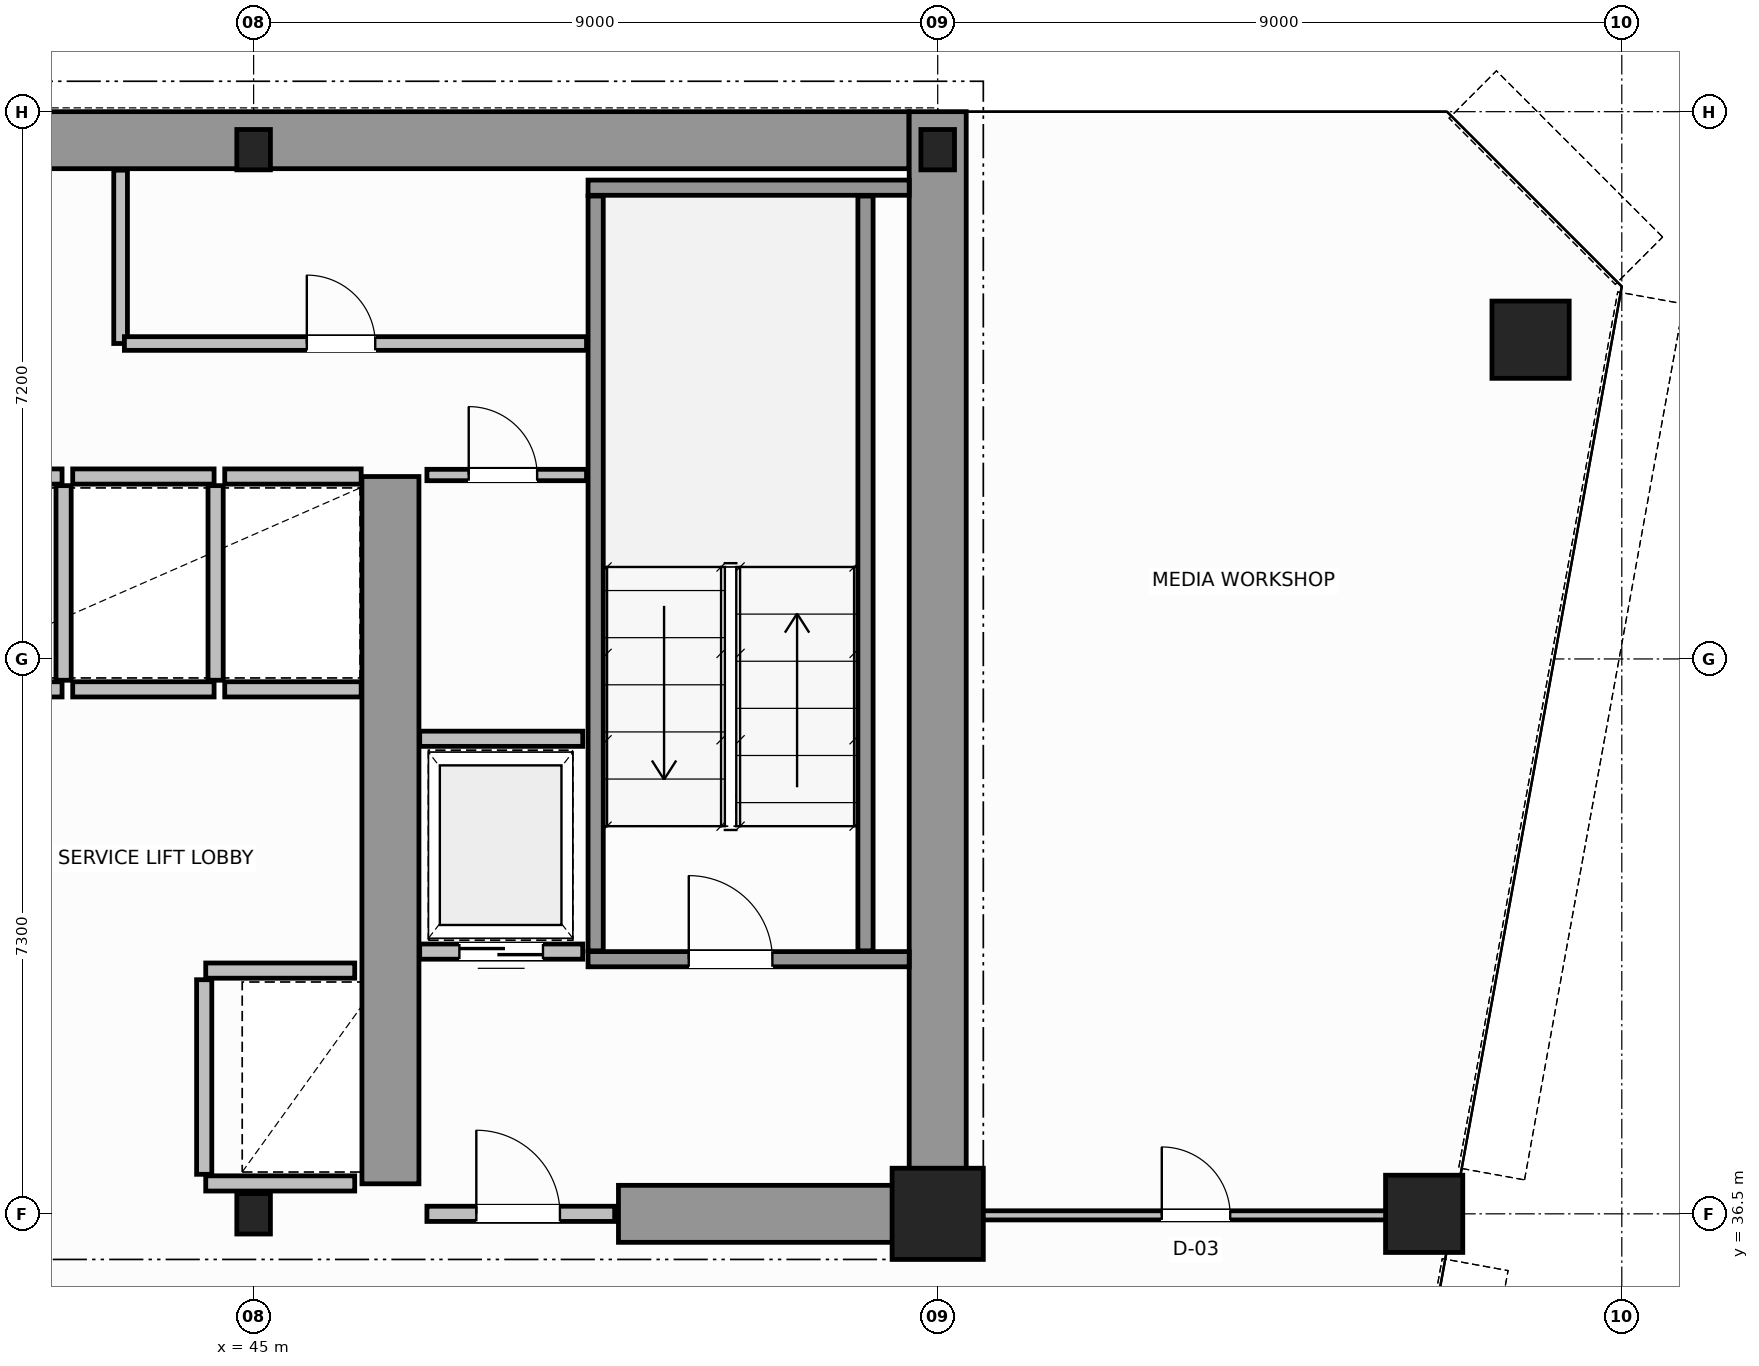
"""IFC4 building model, lengths in metres.
Left out: names, types, materials, properties, quantities, classifications, styles, units other than length and angle.
Written with IfcOpenShell. Run it as: python <this file> out.ifc"""

import sys

from ifc_helpers import new_model, si_unit, direction, frame, frame_2d, origin, origin_2d, place, context, subcontext, project, spatial, rectangle, hollow_circle, i_section, extrude, source, transform, mapped, element, fill, save


model = new_model("IFC4")
c1 = context("Model", 3, precision=1e-05, world=origin(), true_north=direction((0.0, 1.0)))
c2 = subcontext(c1, "Body", "Model", "MODEL_VIEW")
j1 = project(units=[si_unit("LENGTHUNIT", "METRE"), si_unit("PLANEANGLEUNIT", "RADIAN")], contexts=[c1])
p1 = place(None, origin())
s1 = spatial("IfcSite", under=j1, at=p1, CompositionType="ELEMENT")
p2 = place(p1, origin())
s2 = spatial("IfcBuilding", under=s1, at=p2, CompositionType="ELEMENT")
p3 = place(p2, frame((0.0, 0.0, 137.6)))
s3 = spatial("IfcBuildingStorey", under=s2, at=p3, CompositionType="ELEMENT", Elevation=137.6)
m1 = source(origin(), c2, "Body", "SweptSolid", [
    extrude(i_section(OverallWidth=0.442, OverallDepth=0.531, WebThickness=0.065, FlangeThickness=0.076, FilletRadius=0.015, at=origin_2d()), origin(), (0.0, 0.0, 1.0), 3.8),
])
p4 = place(p3, frame((45.0, 36.5, 0.0), z_axis=(0.0, 0.0, 1.0), x_axis=(1.0, 0.0, 0.0)))
e1 = element("IfcColumn", 1, at=p4, inside=s3, PredefinedType="COLUMN", context=c2, shape_type="MappedRepresentation", body=[
    mapped(m1, transform((0.0, 0.0, 0.0), scale=1.0)),
])
m2 = source(origin(), c2, "Body", "SweptSolid", [
    extrude(rectangle(XDim=1.2, YDim=1.2, at=origin_2d()), origin(), (0.0, 0.0, 1.0), 3.8),
])
p5 = place(p3, frame((54.0, 36.5, 0.0), z_axis=(0.0, 0.0, 1.0), x_axis=(1.0, 0.0, 0.0)))
e2 = element("IfcColumn", 2, at=p5, inside=s3, PredefinedType="COLUMN", context=c2, shape_type="MappedRepresentation", body=[
    mapped(m2, transform((0.0, 0.0, 0.0), scale=1.0)),
])
for number, where, z_axis, x_axis in (
    (3, (45.0, 50.5, 0.0), (0.0, 0.0, 1.0), (1.0, 0.0, 0.0)),
    (4, (54.0, 50.5, 0.0), (0.0, 0.0, 1.0), (1.0, 0.0, 0.0)),
):
    element("IfcColumn", number, at=place(p3, frame(where, z_axis=z_axis, x_axis=x_axis)), inside=s3, PredefinedType="COLUMN", context=c2, shape_type="MappedRepresentation", body=[
        mapped(m1, transform((0.0, 0.0, 0.0), scale=1.0)),
    ])
m3 = source(origin(), c2, "Body", "SweptSolid", [
    extrude(hollow_circle(Radius=0.508, WallThickness=0.045, at=origin_2d()), origin(), (0.0, 0.0, 1.0), 3.8),
])
for number, where, z_axis, x_axis in (
    (5, (61.8, 48.0, 0.0), (0.0, 0.0, 1.0), (1.0, 0.0, 0.0)),
    (6, (60.4, 36.5, 0.0), (0.0, 0.0, 1.0), (1.0, 0.0, 0.0)),
):
    element("IfcColumn", number, at=place(p3, frame(where, z_axis=z_axis, x_axis=x_axis)), inside=s3, PredefinedType="COLUMN", context=c2, shape_type="MappedRepresentation", body=[
        mapped(m3, transform((0.0, 0.0, 0.0), scale=1.0)),
    ])
p6 = place(p3, frame((34.002, 50.625, 0.0), z_axis=(0.0, 0.0, 1.0), x_axis=(1.0, 0.0, 0.0)))
e7 = element("IfcWall", 7, at=p6, inside=s3, PredefinedType="SHEAR", context=c2, shape_type="SweptSolid", body=[
    extrude(rectangle(XDim=19.619, YDim=0.75, at=frame_2d((9.81, 0.0))), origin(), (0.0, 0.0, 1.0), 3.8),
])
p7 = place(p3, frame((54.0, 36.5, 0.0), z_axis=(0.0, 0.0, 1.0), x_axis=(0.0, 1.0, 0.0)))
e8 = element("IfcWall", 8, at=p7, inside=s3, PredefinedType="SHEAR", context=c2, shape_type="SweptSolid", body=[
    extrude(rectangle(XDim=14.5, YDim=0.75, at=frame_2d((7.25, 0.0))), origin(), (0.0, 0.0, 1.0), 3.8),
])
p8 = place(p3, frame((49.8, 36.5, 0.0), z_axis=(0.0, 0.0, 1.0), x_axis=(1.0, 0.0, 0.0)))
e9 = element("IfcWall", 9, at=p8, inside=s3, PredefinedType="SHEAR", context=c2, shape_type="SweptSolid", body=[
    extrude(rectangle(XDim=3.805, YDim=0.75, at=frame_2d((1.902, 0.0))), origin(), (0.0, 0.0, 1.0), 2.38),
])
p9 = place(p3, frame((46.8, 36.895, 0.0), z_axis=(0.0, 0.0, 1.0), x_axis=(0.0, 1.0, 0.0)))
e10 = element("IfcWall", 10, at=p9, inside=s3, PredefinedType="SHEAR", context=c2, shape_type="SweptSolid", body=[
    extrude(rectangle(XDim=9.305, YDim=0.75, at=frame_2d((4.652, 0.0))), origin(), (0.0, 0.0, 1.0), 3.8),
])
p10 = place(p3, frame((49.4, 39.85, 0.0), z_axis=(0.0, 0.0, 1.0), x_axis=(1.0, 0.0, 0.0)))
e11 = element("IfcWall", 11, at=p10, inside=s3, PredefinedType="SOLIDWALL", context=c2, shape_type="SweptSolid", body=[
    extrude(rectangle(XDim=4.225, YDim=0.2, at=frame_2d((2.113, 0.0))), origin(), (0.0, 0.0, 1.0), 3.8),
])
p11 = place(p10, frame((1.325, 0.0, 0.0)))
e12 = element("IfcOpeningElement", 12, at=p11, cuts=e11, PredefinedType="OPENING", context=c2, shape_type="SweptSolid", body=[
    extrude(rectangle(XDim=1.1, YDim=2.15, at=frame_2d((0.55, 1.075))), frame((0.0, 0.11, 0.0), z_axis=(0.0, -1.0, 0.0), x_axis=(1.0, 0.0, 0.0)), (0.0, 0.0, 1.0), 0.22),
])
p12 = place(p3, frame((49.4, 50.0, 0.0), z_axis=(0.0, 0.0, 1.0), x_axis=(1.0, 0.0, 0.0)))
e13 = element("IfcWall", 13, at=p12, inside=s3, PredefinedType="SOLIDWALL", context=c2, shape_type="SweptSolid", body=[
    extrude(rectangle(XDim=4.225, YDim=0.2, at=frame_2d((2.113, 0.0))), origin(), (0.0, 0.0, 1.0), 3.8),
])
for number, where, z_axis, x_axis in (
    (14, (49.5, 39.96, 0.0), (0.0, 0.0, 1.0), (0.0, 1.0, 0.0)),
    (15, (53.05, 39.96, 0.0), (0.0, 0.0, 1.0), (0.0, 1.0, 0.0)),
):
    element("IfcWall", number, at=place(p3, frame(where, z_axis=z_axis, x_axis=x_axis)), inside=s3, PredefinedType="SOLIDWALL", context=c2, shape_type="SweptSolid", body=[
        extrude(rectangle(XDim=9.93, YDim=0.2, at=frame_2d((4.965, 0.0))), origin(), (0.0, 0.0, 1.0), 3.8),
    ])
p13 = place(p3, frame((47.28, 36.5, 0.0), z_axis=(0.0, 0.0, 1.0), x_axis=(1.0, 0.0, 0.0)))
e16 = element("IfcWall", 16, at=p13, inside=s3, PredefinedType="SOLIDWALL", context=c2, shape_type="SweptSolid", body=[
    extrude(rectangle(XDim=2.47, YDim=0.2, at=frame_2d((1.235, 0.0))), origin(), (0.0, 0.0, 1.0), 2.37),
])
p14 = place(p13, frame((0.65, 0.0, 0.0)))
e17 = element("IfcOpeningElement", 17, at=p14, cuts=e16, PredefinedType="OPENING", context=c2, shape_type="SweptSolid", body=[
    extrude(rectangle(XDim=1.1, YDim=2.15, at=frame_2d((0.55, 1.075))), frame((0.0, 0.11, 0.0), z_axis=(0.0, -1.0, 0.0), x_axis=(1.0, 0.0, 0.0)), (0.0, 0.0, 1.0), 0.22),
])
p15 = place(p3, frame((44.37, 39.7, 0.0), z_axis=(0.0, 0.0, 1.0), x_axis=(1.0, 0.0, 0.0)))
e18 = element("IfcWall", 18, at=p15, inside=s3, PredefinedType="SOLIDWALL", context=c2, shape_type="SweptSolid", body=[
    extrude(rectangle(XDim=1.96, YDim=0.2, at=frame_2d((0.98, 0.0))), origin(), (0.0, 0.0, 1.0), 3.58),
])
p16 = place(p3, frame((44.37, 36.9, 0.0), z_axis=(0.0, 0.0, 1.0), x_axis=(1.0, 0.0, 0.0)))
e19 = element("IfcWall", 19, at=p16, inside=s3, PredefinedType="SOLIDWALL", context=c2, shape_type="SweptSolid", body=[
    extrude(rectangle(XDim=1.96, YDim=0.2, at=frame_2d((0.98, 0.0))), origin(), (0.0, 0.0, 1.0), 2.37),
])
p17 = place(p3, frame((44.35, 37.02, 0.0), z_axis=(0.0, 0.0, 1.0), x_axis=(0.0, 1.0, 0.0)))
e20 = element("IfcWall", 20, at=p17, inside=s3, PredefinedType="SOLIDWALL", context=c2, shape_type="SweptSolid", body=[
    extrude(rectangle(XDim=2.56, YDim=0.2, at=frame_2d((1.28, 0.0))), origin(), (0.0, 0.0, 1.0), 3.58),
])
for number, where, z_axis, x_axis in (
    (21, (40.62, 43.4, 0.0), (0.0, 0.0, 1.0), (1.0, 0.0, 0.0)),
    (22, (40.62, 46.2, 0.0), (0.0, 0.0, 1.0), (1.0, 0.0, 0.0)),
):
    element("IfcWall", number, at=place(p3, frame(where, z_axis=z_axis, x_axis=x_axis)), inside=s3, PredefinedType="SOLIDWALL", context=c2, shape_type="SweptSolid", body=[
        extrude(rectangle(XDim=1.86, YDim=0.2, at=frame_2d((0.93, 0.0))), origin(), (0.0, 0.0, 1.0), 3.58),
    ])
p18 = place(p3, frame((42.5, 43.52, 0.0), z_axis=(0.0, 0.0, 1.0), x_axis=(0.0, 1.0, 0.0)))
e23 = element("IfcWall", 23, at=p18, inside=s3, PredefinedType="SOLIDWALL", context=c2, shape_type="SweptSolid", body=[
    extrude(rectangle(XDim=2.56, YDim=0.2, at=frame_2d((1.28, 0.0))), origin(), (0.0, 0.0, 1.0), 3.58),
])
for number, where, z_axis, x_axis in (
    (24, (42.62, 43.4, 0.0), (0.0, 0.0, 1.0), (1.0, 0.0, 0.0)),
    (25, (42.62, 46.2, 0.0), (0.0, 0.0, 1.0), (1.0, 0.0, 0.0)),
):
    element("IfcWall", number, at=place(p3, frame(where, z_axis=z_axis, x_axis=x_axis)), inside=s3, PredefinedType="SOLIDWALL", context=c2, shape_type="SweptSolid", body=[
        extrude(rectangle(XDim=1.86, YDim=0.2, at=frame_2d((0.93, 0.0))), origin(), (0.0, 0.0, 1.0), 3.58),
    ])
p19 = place(p3, frame((44.5, 43.52, 0.0), z_axis=(0.0, 0.0, 1.0), x_axis=(0.0, 1.0, 0.0)))
e26 = element("IfcWall", 26, at=p19, inside=s3, PredefinedType="SOLIDWALL", context=c2, shape_type="SweptSolid", body=[
    extrude(rectangle(XDim=2.56, YDim=0.2, at=frame_2d((1.28, 0.0))), origin(), (0.0, 0.0, 1.0), 3.58),
])
for number, where, z_axis, x_axis in (
    (27, (44.62, 43.4, 0.0), (0.0, 0.0, 1.0), (1.0, 0.0, 0.0)),
    (28, (44.62, 46.2, 0.0), (0.0, 0.0, 1.0), (1.0, 0.0, 0.0)),
):
    element("IfcWall", number, at=place(p3, frame(where, z_axis=z_axis, x_axis=x_axis)), inside=s3, PredefinedType="SOLIDWALL", context=c2, shape_type="SweptSolid", body=[
        extrude(rectangle(XDim=1.795, YDim=0.2, at=frame_2d((0.897, 0.0))), origin(), (0.0, 0.0, 1.0), 3.58),
    ])
p20 = place(p3, frame((47.185, 39.95, 0.0), z_axis=(0.0, 0.0, 1.0), x_axis=(1.0, 0.0, 0.0)))
e29 = element("IfcWall", 29, at=p20, inside=s3, PredefinedType="SOLIDWALL", context=c2, shape_type="SweptSolid", body=[
    extrude(rectangle(XDim=2.145, YDim=0.2, at=frame_2d((1.073, 0.0))), origin(), (0.0, 0.0, 1.0), 3.58),
])
p21 = place(p20, frame((0.522, 0.0, 0.0)))
e30 = element("IfcOpeningElement", 30, at=p21, cuts=e29, PredefinedType="OPENING", context=c2, shape_type="SweptSolid", body=[
    extrude(rectangle(XDim=1.1, YDim=2.15, at=frame_2d((0.55, 1.075))), frame((0.0, 0.11, 0.0), z_axis=(0.0, -1.0, 0.0), x_axis=(1.0, 0.0, 0.0)), (0.0, 0.0, 1.0), 0.22),
])
p22 = place(p3, frame((47.185, 42.75, 0.0), z_axis=(0.0, 0.0, 1.0), x_axis=(1.0, 0.0, 0.0)))
e31 = element("IfcWall", 31, at=p22, inside=s3, PredefinedType="SOLIDWALL", context=c2, shape_type="SweptSolid", body=[
    extrude(rectangle(XDim=2.145, YDim=0.2, at=frame_2d((1.073, 0.0))), origin(), (0.0, 0.0, 1.0), 3.58),
])
p23 = place(p3, frame((47.28, 46.22, 0.0), z_axis=(0.0, 0.0, 1.0), x_axis=(1.0, 0.0, 0.0)))
e32 = element("IfcWall", 32, at=p23, inside=s3, PredefinedType="PARTITIONING", context=c2, shape_type="SweptSolid", body=[
    extrude(rectangle(XDim=2.1, YDim=0.15, at=frame_2d((1.05, 0.0))), origin(), (0.0, 0.0, 1.0), 3.58),
])
p24 = place(p23, frame((0.55, 0.0, 0.0)))
e33 = element("IfcOpeningElement", 33, at=p24, cuts=e32, PredefinedType="OPENING", context=c2, shape_type="SweptSolid", body=[
    extrude(rectangle(XDim=0.9, YDim=2.1, at=frame_2d((0.45, 1.05))), frame((0.0, 0.085, 0.0), z_axis=(0.0, -1.0, 0.0), x_axis=(1.0, 0.0, 0.0)), (0.0, 0.0, 1.0), 0.17),
])
p25 = place(p3, frame((43.25, 47.95, 0.0), z_axis=(0.0, 0.0, 1.0), x_axis=(0.0, 1.0, 0.0)))
e34 = element("IfcWall", 34, at=p25, inside=s3, PredefinedType="PLUMBINGWALL", context=c2, shape_type="SweptSolid", body=[
    extrude(rectangle(XDim=2.28, YDim=0.18, at=frame_2d((1.14, 0.0))), origin(), (0.0, 0.0, 1.0), 3.58),
])
p26 = place(p3, frame((43.3, 47.95, 0.0), z_axis=(0.0, 0.0, 1.0), x_axis=(1.0, 0.0, 0.0)))
e35 = element("IfcWall", 35, at=p26, inside=s3, PredefinedType="PLUMBINGWALL", context=c2, shape_type="SweptSolid", body=[
    extrude(rectangle(XDim=6.08, YDim=0.18, at=frame_2d((3.04, 0.0))), origin(), (0.0, 0.0, 1.0), 3.58),
])
p27 = place(p26, frame((2.4, 0.0, 0.0)))
e36 = element("IfcOpeningElement", 36, at=p27, cuts=e35, PredefinedType="OPENING", context=c2, shape_type="SweptSolid", body=[
    extrude(rectangle(XDim=0.9, YDim=2.15, at=frame_2d((0.45, 1.075))), frame((0.0, 0.1, 0.0), z_axis=(0.0, -1.0, 0.0), x_axis=(1.0, 0.0, 0.0)), (0.0, 0.0, 1.0), 0.2),
])
p28 = place(p3, frame((54.06, 36.48, 0.0), z_axis=(0.0, 0.0, 1.0), x_axis=(1.0, 0.0, 0.0)))
e37 = element("IfcWall", 37, at=p28, inside=s3, PredefinedType="PARTITIONING", context=c2, shape_type="SweptSolid", body=[
    extrude(rectangle(XDim=6.676, YDim=0.12, at=frame_2d((3.338, 0.0))), origin(), (0.0, 0.0, 1.0), 2.87),
])
p29 = place(p28, frame((2.888, 0.0, 0.0)))
e38 = element("IfcOpeningElement", 38, at=p29, cuts=e37, PredefinedType="OPENING", context=c2, shape_type="SweptSolid", body=[
    extrude(rectangle(XDim=0.9, YDim=2.15, at=frame_2d((0.45, 1.075))), frame((0.0, 0.07, 0.0), z_axis=(0.0, -1.0, 0.0), x_axis=(1.0, 0.0, 0.0)), (0.0, 0.0, 1.0), 0.14),
])
m4 = source(origin(), c2, "Body", "SweptSolid", [
    extrude(rectangle(XDim=1.1, YDim=2.15, at=frame_2d((0.55, 1.075))), frame((0.0, 0.025, 0.0), z_axis=(0.0, -1.0, 0.0), x_axis=(1.0, 0.0, 0.0)), (0.0, 0.0, 1.0), 0.05),
])
p30 = place(p11, origin())
e39 = element("IfcDoor", 39, at=p30, inside=s3, OperationType="SINGLE_SWING_RIGHT", PredefinedType="DOOR", context=c2, shape_type="MappedRepresentation", body=[
    mapped(m4, transform((0.0, 0.0, 0.0), scale=1.0)),
])
fill(e12, e39)
p31 = place(p14, origin())
e40 = element("IfcDoor", 40, at=p31, inside=s3, OperationType="SINGLE_SWING_LEFT", PredefinedType="DOOR", context=c2, shape_type="MappedRepresentation", body=[
    mapped(m4, transform((0.0, 0.0, 0.0), scale=1.0)),
])
fill(e17, e40)
p32 = place(p21, origin())
e41 = element("IfcDoor", 41, at=p32, inside=s3, OperationType="DOUBLE_DOOR_SLIDING", PredefinedType="DOOR", context=c2, shape_type="MappedRepresentation", body=[
    mapped(m4, transform((0.0, 0.0, 0.0), scale=1.0)),
])
fill(e30, e41)
m5 = source(origin(), c2, "Body", "SweptSolid", [
    extrude(rectangle(XDim=0.9, YDim=2.1, at=frame_2d((0.45, 1.05))), frame((0.0, 0.025, 0.0), z_axis=(0.0, -1.0, 0.0), x_axis=(1.0, 0.0, 0.0)), (0.0, 0.0, 1.0), 0.05),
])
p33 = place(p24, origin())
e42 = element("IfcDoor", 42, at=p33, inside=s3, OperationType="SINGLE_SWING_RIGHT", PredefinedType="DOOR", context=c2, shape_type="MappedRepresentation", body=[
    mapped(m5, transform((0.0, 0.0, 0.0), scale=1.0)),
])
fill(e33, e42)
m6 = source(origin(), c2, "Body", "SweptSolid", [
    extrude(rectangle(XDim=0.9, YDim=2.15, at=frame_2d((0.45, 1.075))), frame((0.0, 0.025, 0.0), z_axis=(0.0, -1.0, 0.0), x_axis=(1.0, 0.0, 0.0)), (0.0, 0.0, 1.0), 0.05),
])
p34 = place(p27, origin())
e43 = element("IfcDoor", 43, at=p34, inside=s3, OperationType="SINGLE_SWING_RIGHT", PredefinedType="DOOR", context=c2, shape_type="MappedRepresentation", body=[
    mapped(m6, transform((0.0, 0.0, 0.0), scale=1.0)),
])
fill(e36, e43)
p35 = place(p29, origin())
e44 = element("IfcDoor", 44, at=p35, inside=s3, OperationType="SINGLE_SWING_RIGHT", PredefinedType="DOOR", context=c2, shape_type="MappedRepresentation", body=[
    mapped(m6, transform((0.0, 0.0, 0.0), scale=1.0)),
])
fill(e38, e44)
save(model, sys.argv[1])
